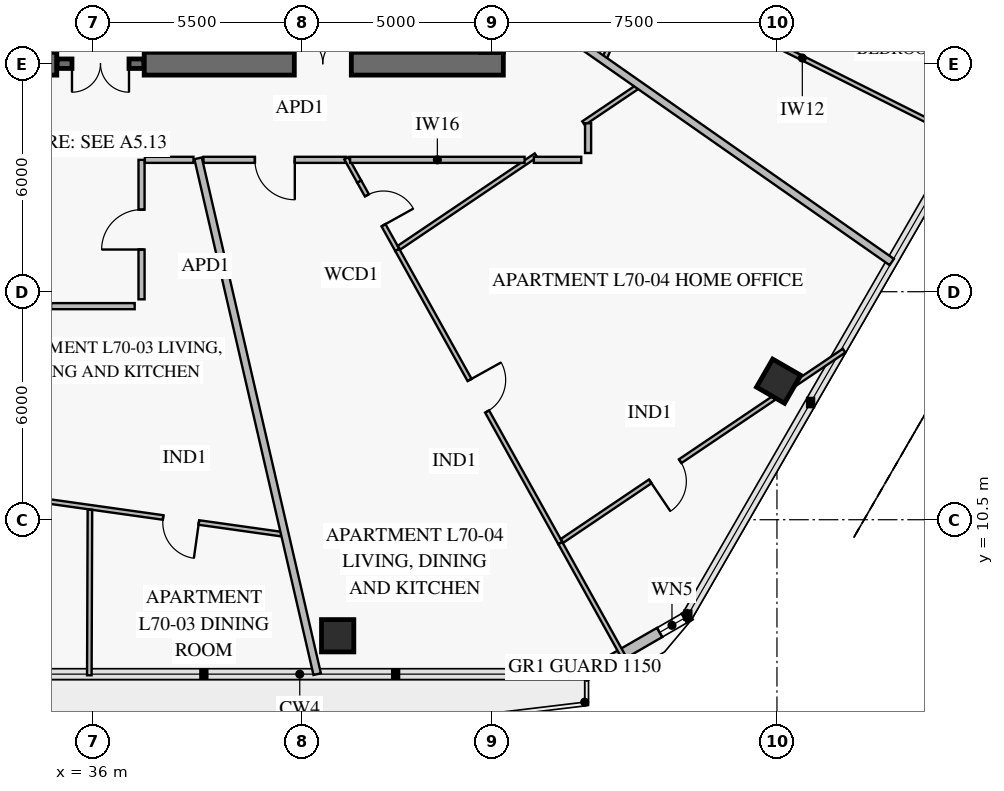
"""IFC4 building model, lengths in metres.
Left out: names, types, materials, properties, quantities, classifications, styles, units other than length and angle.
Written with IfcOpenShell. Run it as: python <this file> out.ifc"""

import sys

from ifc_helpers import new_model, si_unit, direction, frame, frame_2d, origin, origin_2d, place, context, subcontext, project, spatial, rectangle, extrude, element, fill, save


model = new_model("IFC4")
c1 = context("Model", 3, precision=1e-05, world=origin(), true_north=direction((0.0, 1.0)))
c2 = subcontext(c1, "Body", "Model", "MODEL_VIEW")
j1 = project(units=[si_unit("LENGTHUNIT", "METRE"), si_unit("PLANEANGLEUNIT", "RADIAN")], contexts=[c1])
p1 = place(None, origin())
s1 = spatial("IfcSite", under=j1, at=p1, CompositionType="ELEMENT")
p2 = place(p1, origin())
s2 = spatial("IfcBuilding", under=s1, at=p2, CompositionType="ELEMENT")
p3 = place(p2, frame((0.0, 0.0, 276.8)))
s3 = spatial("IfcBuildingStorey", under=s2, at=p3, CompositionType="ELEMENT", Elevation=276.8)
p4 = place(p3, frame((25.2, 22.5, 0.0), z_axis=(0.0, 0.0, 1.0), x_axis=(1.0, 0.0, 0.0)))
e1 = element("IfcWall", 1, at=p4, inside=s3, PredefinedType="SHEAR", context=c2, shape_type="SweptSolid", body=[
    extrude(rectangle(XDim=9.85, YDim=0.6, at=frame_2d((4.925, 0.0))), origin(), (0.0, 0.0, 1.0), 3.8),
])
p5 = place(p4, frame((4.2, 0.0, 0.0)))
e2 = element("IfcOpeningElement", 2, at=p5, cuts=e1, PredefinedType="OPENING", context=c2, shape_type="SweptSolid", body=[
    extrude(rectangle(XDim=1.5, YDim=2.15, at=frame_2d((0.75, 1.075))), frame((0.0, 0.312, 0.0), z_axis=(0.0, -1.0, 0.0), x_axis=(1.0, 0.0, 0.0)), (0.0, 0.0, 1.0), 0.624),
])
p6 = place(p3, frame((37.35, 22.5, 0.0), z_axis=(0.0, 0.0, 1.0), x_axis=(1.0, 0.0, 0.0)))
e3 = element("IfcWall", 3, at=p6, inside=s3, PredefinedType="SHEAR", context=c2, shape_type="SweptSolid", body=[
    extrude(rectangle(XDim=9.45, YDim=0.6, at=frame_2d((4.725, 0.0))), origin(), (0.0, 0.0, 1.0), 3.8),
])
p7 = place(p6, frame((3.95, 0.0, 0.0)))
e4 = element("IfcOpeningElement", 4, at=p7, cuts=e3, PredefinedType="OPENING", context=c2, shape_type="SweptSolid", body=[
    extrude(rectangle(XDim=1.5, YDim=2.15, at=frame_2d((0.75, 1.075))), frame((0.0, 0.312, 0.0), z_axis=(0.0, -1.0, 0.0), x_axis=(1.0, 0.0, 0.0)), (0.0, 0.0, 1.0), 0.624),
])
p8 = place(p3, frame((46.5, 22.8, 0.0), z_axis=(0.0, 0.0, 1.0), x_axis=(0.0, 1.0, 0.0)))
e5 = element("IfcWall", 5, at=p8, inside=s3, PredefinedType="SHEAR", context=c2, shape_type="SweptSolid", body=[
    extrude(rectangle(XDim=18.4, YDim=0.6, at=frame_2d((9.2, 0.0))), origin(), (0.0, 0.0, 1.0), 3.8),
])
p9 = place(p8, frame((8.95, 0.0, 0.0)))
e6 = element("IfcOpeningElement", 6, at=p9, cuts=e5, PredefinedType="OPENING", context=c2, shape_type="SweptSolid", body=[
    extrude(rectangle(XDim=1.1, YDim=2.15, at=frame_2d((0.55, 1.075))), frame((0.0, 0.312, 0.0), z_axis=(0.0, -1.0, 0.0), x_axis=(1.0, 0.0, 0.0)), (0.0, 0.0, 1.0), 0.624),
])
for number, where, z_axis, x_axis in (
    (7, (42.441, 7.446, 0.0), (0.0, 0.0, 1.0), (1.0, 0.0, 0.0)),
    (8, (54.044, 14.145, 0.0), (0.0, 0.0, 1.0), (0.5, 0.866, 0.0)),
):
    element("IfcColumn", number, at=place(p3, frame(where, z_axis=z_axis, x_axis=x_axis)), inside=s3, PredefinedType="COLUMN", context=c2, shape_type="SweptSolid", body=[
        extrude(rectangle(XDim=0.85, YDim=0.85, at=origin_2d()), origin(), (0.0, 0.0, 1.0), 3.55),
    ])
p10 = place(p3, frame((51.715, 7.996, 0.0), z_axis=(0.0, 0.0, 1.0), x_axis=(-0.866028773314, -0.499994163758, 0.0)))
e9 = element("IfcWall", 9, at=p10, inside=s3, PredefinedType="SOLIDWALL", context=c2, shape_type="SweptSolid", body=[
    extrude(rectangle(XDim=3.215, YDim=0.28, at=frame_2d((1.607, 0.0))), origin(), (0.0, 0.0, 1.0), 3.55),
])
p11 = place(p10, frame((0.176, 0.0, 0.85)))
e10 = element("IfcOpeningElement", 10, at=p11, cuts=e9, PredefinedType="OPENING", context=c2, shape_type="SweptSolid", body=[
    extrude(rectangle(XDim=0.75, YDim=1.5, at=frame_2d((0.375, 0.75))), frame((0.0, 0.152, 0.0), z_axis=(0.0, -1.0, 0.0), x_axis=(1.0, 0.0, 0.0)), (0.0, 0.0, 1.0), 0.304),
])
p12 = place(p3, frame((35.06, 22.5, 0.0), z_axis=(0.0, 0.0, 1.0), x_axis=(1.0, 0.0, 0.0)))
e11 = element("IfcWall", 11, at=p12, inside=s3, PredefinedType="SOLIDWALL", context=c2, shape_type="SweptSolid", body=[
    extrude(rectangle(XDim=2.28, YDim=0.25, at=frame_2d((1.14, 0.0))), origin(), (0.0, 0.0, 1.0), 3.8),
])
p13 = place(p12, frame((0.39, 0.0, 0.0)))
e12 = element("IfcOpeningElement", 12, at=p13, cuts=e11, PredefinedType="OPENING", context=c2, shape_type="SweptSolid", body=[
    extrude(rectangle(XDim=1.5, YDim=2.15, at=frame_2d((0.75, 1.075))), frame((0.0, 0.137, 0.0), z_axis=(0.0, -1.0, 0.0), x_axis=(1.0, 0.0, 0.0)), (0.0, 0.0, 1.0), 0.274),
])
p14 = place(p3, frame((31.193, 11.494, 0.0), z_axis=(0.0, 0.0, 1.0), x_axis=(0.990267998159, -0.139173603183, 0.0)))
e13 = element("IfcWall", 13, at=p14, inside=s3, PredefinedType="PARTITIONING", context=c2, shape_type="SweptSolid", body=[
    extrude(rectangle(XDim=9.855, YDim=0.12, at=frame_2d((4.928, 0.0))), origin(), (0.0, 0.0, 1.0), 3.55),
])
p15 = place(p14, frame((2.034, 0.0, 0.0)))
e14 = element("IfcOpeningElement", 14, at=p15, cuts=e13, PredefinedType="OPENING", context=c2, shape_type="SweptSolid", body=[
    extrude(rectangle(XDim=0.95, YDim=2.1, at=frame_2d((0.475, 1.05))), frame((0.0, 0.072, 0.0), z_axis=(0.0, -1.0, 0.0), x_axis=(1.0, 0.0, 0.0)), (0.0, 0.0, 1.0), 0.144),
])
p16 = place(p14, frame((6.72, 0.0, 0.0)))
e15 = element("IfcOpeningElement", 15, at=p16, cuts=e13, PredefinedType="OPENING", context=c2, shape_type="SweptSolid", body=[
    extrude(rectangle(XDim=0.95, YDim=2.1, at=frame_2d((0.475, 1.05))), frame((0.0, 0.072, 0.0), z_axis=(0.0, -1.0, 0.0), x_axis=(1.0, 0.0, 0.0)), (0.0, 0.0, 1.0), 0.144),
])
p17 = place(p3, frame((37.28, 16.3, 0.0), z_axis=(0.0, 0.0, 1.0), x_axis=(0.0, 1.0, 0.0)))
e16 = element("IfcWall", 16, at=p17, inside=s3, PredefinedType="PARTITIONING", context=c2, shape_type="SweptSolid", body=[
    extrude(rectangle(XDim=3.67, YDim=0.16, at=frame_2d((1.835, 0.0))), origin(), (0.0, 0.0, 1.0), 3.55),
])
p18 = place(p17, frame((1.31, 0.0, 0.0)))
e17 = element("IfcOpeningElement", 17, at=p18, cuts=e16, PredefinedType="OPENING", context=c2, shape_type="SweptSolid", body=[
    extrude(rectangle(XDim=1.05, YDim=2.15, at=frame_2d((0.525, 1.075))), frame((0.0, 0.092, 0.0), z_axis=(0.0, -1.0, 0.0), x_axis=(1.0, 0.0, 0.0)), (0.0, 0.0, 1.0), 0.184),
])
p19 = place(p3, frame((43.007, 19.4, 0.0), z_axis=(0.0, 0.0, 1.0), x_axis=(0.48609530241, -0.873905805551, 0.0)))
e18 = element("IfcWall", 18, at=p19, inside=s3, PredefinedType="PARTITIONING", context=c2, shape_type="SweptSolid", body=[
    extrude(rectangle(XDim=2.062, YDim=0.12, at=frame_2d((1.031, 0.0))), origin(), (0.0, 0.0, 1.0), 3.55),
])
p20 = place(p19, frame((0.416, 0.0, 0.0)))
e19 = element("IfcOpeningElement", 19, at=p20, cuts=e18, PredefinedType="OPENING", context=c2, shape_type="SweptSolid", body=[
    extrude(rectangle(XDim=0.9, YDim=2.1, at=frame_2d((0.45, 1.05))), frame((0.0, 0.072, 0.0), z_axis=(0.0, -1.0, 0.0), x_axis=(1.0, 0.0, 0.0)), (0.0, 0.0, 1.0), 0.144),
])
p21 = place(p3, frame((44.01, 17.598, 0.0), z_axis=(0.0, 0.0, 1.0), x_axis=(0.486020933701, -0.873947167742, 0.0)))
e20 = element("IfcWall", 20, at=p21, inside=s3, PredefinedType="PARTITIONING", context=c2, shape_type="SweptSolid", body=[
    extrude(rectangle(XDim=8.828, YDim=0.12, at=frame_2d((4.414, 0.0))), origin(), (0.0, 0.0, 1.0), 2.93),
])
p22 = place(p21, frame((3.914, 0.0, 0.0)))
e21 = element("IfcOpeningElement", 21, at=p22, cuts=e20, PredefinedType="OPENING", context=c2, shape_type="SweptSolid", body=[
    extrude(rectangle(XDim=0.95, YDim=2.1, at=frame_2d((0.475, 1.05))), frame((0.0, 0.072, 0.0), z_axis=(0.0, -1.0, 0.0), x_axis=(1.0, 0.0, 0.0)), (0.0, 0.0, 1.0), 0.144),
])
p23 = place(p3, frame((48.344, 9.943, 0.0), z_axis=(0.0, 0.0, 1.0), x_axis=(0.829047449098, 0.559178260614, 0.0)))
e22 = element("IfcWall", 22, at=p23, inside=s3, PredefinedType="PARTITIONING", context=c2, shape_type="SweptSolid", body=[
    extrude(rectangle(XDim=6.719, YDim=0.12, at=frame_2d((3.359, 0.0))), origin(), (0.0, 0.0, 1.0), 3.55),
])
p24 = place(p23, frame((2.8, 0.0, 0.0)))
e23 = element("IfcOpeningElement", 23, at=p24, cuts=e22, PredefinedType="OPENING", context=c2, shape_type="SweptSolid", body=[
    extrude(rectangle(XDim=0.95, YDim=2.1, at=frame_2d((0.475, 1.05))), frame((0.0, 0.072, 0.0), z_axis=(0.0, -1.0, 0.0), x_axis=(1.0, 0.0, 0.0)), (0.0, 0.0, 1.0), 0.144),
])
p25 = place(p3, frame((38.909, 19.97, 0.0), z_axis=(0.0, 0.0, 1.0), x_axis=(1.0, 0.0, 0.0)))
e24 = element("IfcWall", 24, at=p25, inside=s3, PredefinedType="PARTITIONING", context=c2, shape_type="SweptSolid", body=[
    extrude(rectangle(XDim=3.759, YDim=0.16, at=frame_2d((1.879, 0.0))), origin(), (0.0, 0.0, 1.0), 2.95),
])
p26 = place(p25, frame((1.354, 0.0, 0.0)))
e25 = element("IfcOpeningElement", 25, at=p26, cuts=e24, PredefinedType="OPENING", context=c2, shape_type="SweptSolid", body=[
    extrude(rectangle(XDim=1.05, YDim=2.15, at=frame_2d((0.525, 1.075))), frame((0.0, 0.092, 0.0), z_axis=(0.0, -1.0, 0.0), x_axis=(1.0, 0.0, 0.0)), (0.0, 0.0, 1.0), 0.184),
])
p27 = place(p3, frame((49.46, 22.628, 0.0), z_axis=(0.0, 0.0, 1.0), x_axis=(0.385248544759, 0.922812851428, 0.0)))
e26 = element("IfcWall", 26, at=p27, inside=s3, PredefinedType="PARTITIONING", context=c2, shape_type="SweptSolid", body=[
    extrude(rectangle(XDim=6.926, YDim=0.12, at=frame_2d((3.463, 0.0))), origin(), (0.0, 0.0, 1.0), 2.95),
])
p28 = place(p27, frame((0.753, 0.0, 0.0)))
e27 = element("IfcOpeningElement", 27, at=p28, cuts=e26, PredefinedType="OPENING", context=c2, shape_type="SweptSolid", body=[
    extrude(rectangle(XDim=0.95, YDim=2.1, at=frame_2d((0.475, 1.05))), frame((0.0, 0.072, 0.0), z_axis=(0.0, -1.0, 0.0), x_axis=(1.0, 0.0, 0.0)), (0.0, 0.0, 1.0), 0.144),
])
p29 = place(p27, frame((2.988, 0.0, 0.0)))
e28 = element("IfcOpeningElement", 28, at=p29, cuts=e26, PredefinedType="OPENING", context=c2, shape_type="SweptSolid", body=[
    extrude(rectangle(XDim=0.95, YDim=2.1, at=frame_2d((0.475, 1.05))), frame((0.0, 0.072, 0.0), z_axis=(0.0, -1.0, 0.0), x_axis=(1.0, 0.0, 0.0)), (0.0, 0.0, 1.0), 0.144),
])
p30 = place(p27, frame((5.222, 0.0, 0.0)))
e29 = element("IfcOpeningElement", 29, at=p30, cuts=e26, PredefinedType="OPENING", context=c2, shape_type="SweptSolid", body=[
    extrude(rectangle(XDim=0.95, YDim=2.1, at=frame_2d((0.475, 1.05))), frame((0.0, 0.072, 0.0), z_axis=(0.0, -1.0, 0.0), x_axis=(1.0, 0.0, 0.0)), (0.0, 0.0, 1.0), 0.144),
])
p31 = place(p3, frame((35.922, 10.761, 0.0), z_axis=(0.0, 0.0, 1.0), x_axis=(-0.003644495, -0.999993358806, 0.0)))
e30 = element("IfcWall", 30, at=p31, inside=s3, PredefinedType="PARTITIONING", context=c2, shape_type="SweptSolid", body=[
    extrude(rectangle(XDim=4.354, YDim=0.12, at=frame_2d((2.177, 0.0))), origin(), (0.0, 0.0, 1.0), 2.93),
])
p32 = place(p3, frame((38.768, 20.01, 0.0), z_axis=(0.0, 0.0, 1.0), x_axis=(0.224954220799, -0.974369333746, 0.0)))
e31 = element("IfcWall", 31, at=p32, inside=s3, PredefinedType="PARTITIONING", context=c2, shape_type="SweptSolid", body=[
    extrude(rectangle(XDim=13.931, YDim=0.2, at=frame_2d((6.965, 0.0))), origin(), (0.0, 0.0, 1.0), 2.93),
])
p33 = place(p3, frame((42.667, 20.011, 0.0), z_axis=(0.0, 0.0, 1.0), x_axis=(0.485880005056, -0.874025526336, 0.0)))
e32 = element("IfcWall", 32, at=p33, inside=s3, PredefinedType="PARTITIONING", context=c2, shape_type="SweptSolid", body=[
    extrude(rectangle(XDim=0.699, YDim=0.12, at=frame_2d((0.35, 0.0))), origin(), (0.0, 0.0, 1.0), 3.55),
])
p34 = place(p3, frame((48.3, 9.883, 0.0), z_axis=(0.0, 0.0, 1.0), x_axis=(0.486055789074, -0.873927783005, 0.0)))
e33 = element("IfcWall", 33, at=p34, inside=s3, PredefinedType="PARTITIONING", context=c2, shape_type="SweptSolid", body=[
    extrude(rectangle(XDim=3.715, YDim=0.12, at=frame_2d((1.857, 0.0))), origin(), (0.0, 0.0, 1.0), 3.55),
])
p35 = place(p3, frame((44.054, 17.658, 0.0), z_axis=(0.0, 0.0, 1.0), x_axis=(0.829023707323, 0.559213458973, 0.0)))
e34 = element("IfcWall", 34, at=p35, inside=s3, PredefinedType="PARTITIONING", context=c2, shape_type="SweptSolid", body=[
    extrude(rectangle(XDim=4.349, YDim=0.12, at=frame_2d((2.174, 0.0))), origin(), (0.0, 0.0, 1.0), 3.55),
])
p36 = place(p3, frame((48.91, 20.934, 0.0), z_axis=(0.0, 0.0, 1.0), x_axis=(0.829049195255, 0.559175671723, 0.0)))
e35 = element("IfcWall", 35, at=p36, inside=s3, PredefinedType="PARTITIONING", context=c2, shape_type="SweptSolid", body=[
    extrude(rectangle(XDim=1.721, YDim=0.12, at=frame_2d((0.861, 0.0))), origin(), (0.0, 0.0, 1.0), 3.55),
])
p37 = place(p3, frame((54.489, 14.087, 0.0), z_axis=(0.0, 0.0, 1.0), x_axis=(0.829114812238, 0.559078373868, 0.0)))
e36 = element("IfcWall", 36, at=p37, inside=s3, PredefinedType="PARTITIONING", context=c2, shape_type="SweptSolid", body=[
    extrude(rectangle(XDim=1.542, YDim=0.12, at=frame_2d((0.771, 0.0))), origin(), (0.0, 0.0, 1.0), 3.55),
])
p38 = place(p3, frame((46.808, 24.432, 0.0), z_axis=(0.0, 0.0, 1.0), x_axis=(0.819149112162, -0.57358062384, 0.0)))
e37 = element("IfcWall", 37, at=p38, inside=s3, PredefinedType="PARTITIONING", context=c2, shape_type="SweptSolid", body=[
    extrude(rectangle(XDim=12.467, YDim=0.2, at=frame_2d((6.233, 0.0))), origin(), (0.0, 0.0, 1.0), 2.93),
])
p39 = place(p3, frame((50.429, 24.772, 0.0), z_axis=(0.0, 0.0, 1.0), x_axis=(0.894097326917, -0.447872716294, 0.0)))
e38 = element("IfcWall", 38, at=p39, inside=s3, PredefinedType="PARTITIONING", context=c2, shape_type="SweptSolid", body=[
    extrude(rectangle(XDim=9.48, YDim=0.12, at=frame_2d((4.74, 0.0))), origin(), (0.0, 0.0, 1.0), 2.93),
])
p40 = place(p3, frame((34.9, 16.12, 0.0), z_axis=(0.0, 0.0, 1.0), x_axis=(1.0, 0.0, 0.0)))
e39 = element("IfcWall", 39, at=p40, inside=s3, PredefinedType="PARTITIONING", context=c2, shape_type="SweptSolid", body=[
    extrude(rectangle(XDim=2.2, YDim=0.16, at=frame_2d((1.1, 0.0))), origin(), (0.0, 0.0, 1.0), 3.55),
])
p41 = place(p3, frame((37.368, 19.97, 0.0), z_axis=(0.0, 0.0, 1.0), x_axis=(1.0, 0.0, 0.0)))
e40 = element("IfcWall", 40, at=p41, inside=s3, PredefinedType="PARTITIONING", context=c2, shape_type="SweptSolid", body=[
    extrude(rectangle(XDim=1.279, YDim=0.16, at=frame_2d((0.639, 0.0))), origin(), (0.0, 0.0, 1.0), 3.55),
])
p42 = place(p3, frame((42.768, 19.97, 0.0), z_axis=(0.0, 0.0, 1.0), x_axis=(1.0, 0.0, 0.0)))
e41 = element("IfcWall", 41, at=p42, inside=s3, PredefinedType="PARTITIONING", context=c2, shape_type="SweptSolid", body=[
    extrude(rectangle(XDim=4.592, YDim=0.16, at=frame_2d((2.296, 0.0))), origin(), (0.0, 0.0, 1.0), 3.55),
])
p43 = place(p3, frame((47.603, 19.97, 0.0), z_axis=(0.0, 0.0, 1.0), x_axis=(1.0, 0.0, 0.0)))
e42 = element("IfcWall", 42, at=p43, inside=s3, PredefinedType="PARTITIONING", context=c2, shape_type="SweptSolid", body=[
    extrude(rectangle(XDim=1.247, YDim=0.16, at=frame_2d((0.624, 0.0))), origin(), (0.0, 0.0, 1.0), 2.95),
])
p44 = place(p3, frame((49.03, 20.15, 0.0), z_axis=(0.0, 0.0, 1.0), x_axis=(0.0, 1.0, 0.0)))
e43 = element("IfcWall", 43, at=p44, inside=s3, PredefinedType="PARTITIONING", context=c2, shape_type="SweptSolid", body=[
    extrude(rectangle(XDim=0.783, YDim=0.16, at=frame_2d((0.391, 0.0))), origin(), (0.0, 0.0, 1.0), 3.55),
])
p45 = place(p11, origin())
e44 = element("IfcWindow", 44, at=p45, inside=s3, PartitioningType="SINGLE_PANEL", PredefinedType="WINDOW", context=c2, shape_type="SweptSolid", body=[
    extrude(rectangle(XDim=0.75, YDim=1.5, at=frame_2d((0.375, 0.75))), frame((0.0, 0.03, 0.0), z_axis=(0.0, -1.0, 0.0), x_axis=(1.0, 0.0, 0.0)), (0.0, 0.0, 1.0), 0.06),
])
fill(e10, e44)
p46 = place(p7, origin())
e45 = element("IfcDoor", 45, at=p46, inside=s3, OperationType="DOUBLE_DOOR_SINGLE_SWING", PredefinedType="DOOR", context=c2, shape_type="SweptSolid", body=[
    extrude(rectangle(XDim=1.5, YDim=2.15, at=frame_2d((0.75, 1.075))), frame((0.0, 0.025, 0.0), z_axis=(0.0, -1.0, 0.0), x_axis=(1.0, 0.0, 0.0)), (0.0, 0.0, 1.0), 0.05),
])
fill(e4, e45)
p47 = place(p13, frame((1.5, 0.0, 0.0), z_axis=(0.0, 0.0, 1.0), x_axis=(-1.0, 0.0, 0.0)))
e46 = element("IfcDoor", 46, at=p47, inside=s3, OperationType="DOUBLE_DOOR_SINGLE_SWING", PredefinedType="DOOR", context=c2, shape_type="SweptSolid", body=[
    extrude(rectangle(XDim=1.5, YDim=2.15, at=frame_2d((0.75, 1.075))), frame((0.0, 0.025, 0.0), z_axis=(0.0, -1.0, 0.0), x_axis=(1.0, 0.0, 0.0)), (0.0, 0.0, 1.0), 0.05),
])
fill(e12, e46)
p48 = place(p16, frame((0.95, 0.0, 0.0), z_axis=(0.0, 0.0, 1.0), x_axis=(-1.0, 0.0, 0.0)))
e47 = element("IfcDoor", 47, at=p48, inside=s3, OperationType="SINGLE_SWING_LEFT", PredefinedType="DOOR", context=c2, shape_type="SweptSolid", body=[
    extrude(rectangle(XDim=0.95, YDim=2.1, at=frame_2d((0.475, 1.05))), frame((0.0, 0.025, 0.0), z_axis=(0.0, -1.0, 0.0), x_axis=(1.0, 0.0, 0.0)), (0.0, 0.0, 1.0), 0.05),
])
fill(e15, e47)
p49 = place(p18, origin())
e48 = element("IfcDoor", 48, at=p49, inside=s3, OperationType="SINGLE_SWING_LEFT", PredefinedType="DOOR", context=c2, shape_type="SweptSolid", body=[
    extrude(rectangle(XDim=1.05, YDim=2.15, at=frame_2d((0.525, 1.075))), frame((0.0, 0.025, 0.0), z_axis=(0.0, -1.0, 0.0), x_axis=(1.0, 0.0, 0.0)), (0.0, 0.0, 1.0), 0.05),
])
fill(e17, e48)
p50 = place(p20, origin())
e49 = element("IfcDoor", 49, at=p50, inside=s3, OperationType="SINGLE_SWING_RIGHT", PredefinedType="DOOR", context=c2, shape_type="SweptSolid", body=[
    extrude(rectangle(XDim=0.9, YDim=2.1, at=frame_2d((0.45, 1.05))), frame((0.0, 0.025, 0.0), z_axis=(0.0, -1.0, 0.0), x_axis=(1.0, 0.0, 0.0)), (0.0, 0.0, 1.0), 0.05),
])
fill(e19, e49)
p51 = place(p22, origin())
e50 = element("IfcDoor", 50, at=p51, inside=s3, OperationType="SINGLE_SWING_LEFT", PredefinedType="DOOR", context=c2, shape_type="SweptSolid", body=[
    extrude(rectangle(XDim=0.95, YDim=2.1, at=frame_2d((0.475, 1.05))), frame((0.0, 0.025, 0.0), z_axis=(0.0, -1.0, 0.0), x_axis=(1.0, 0.0, 0.0)), (0.0, 0.0, 1.0), 0.05),
])
fill(e21, e50)
p52 = place(p24, frame((0.95, 0.0, 0.0), z_axis=(0.0, 0.0, 1.0), x_axis=(-1.0, 0.0, 0.0)))
e51 = element("IfcDoor", 51, at=p52, inside=s3, OperationType="SINGLE_SWING_RIGHT", PredefinedType="DOOR", context=c2, shape_type="SweptSolid", body=[
    extrude(rectangle(XDim=0.95, YDim=2.1, at=frame_2d((0.475, 1.05))), frame((0.0, 0.025, 0.0), z_axis=(0.0, -1.0, 0.0), x_axis=(1.0, 0.0, 0.0)), (0.0, 0.0, 1.0), 0.05),
])
fill(e23, e51)
p53 = place(p26, frame((1.05, 0.0, 0.0), z_axis=(0.0, 0.0, 1.0), x_axis=(-1.0, 0.0, 0.0)))
e52 = element("IfcDoor", 52, at=p53, inside=s3, OperationType="SINGLE_SWING_LEFT", PredefinedType="DOOR", context=c2, shape_type="SweptSolid", body=[
    extrude(rectangle(XDim=1.05, YDim=2.15, at=frame_2d((0.525, 1.075))), frame((0.0, 0.025, 0.0), z_axis=(0.0, -1.0, 0.0), x_axis=(1.0, 0.0, 0.0)), (0.0, 0.0, 1.0), 0.05),
])
fill(e25, e52)
save(model, sys.argv[1])
